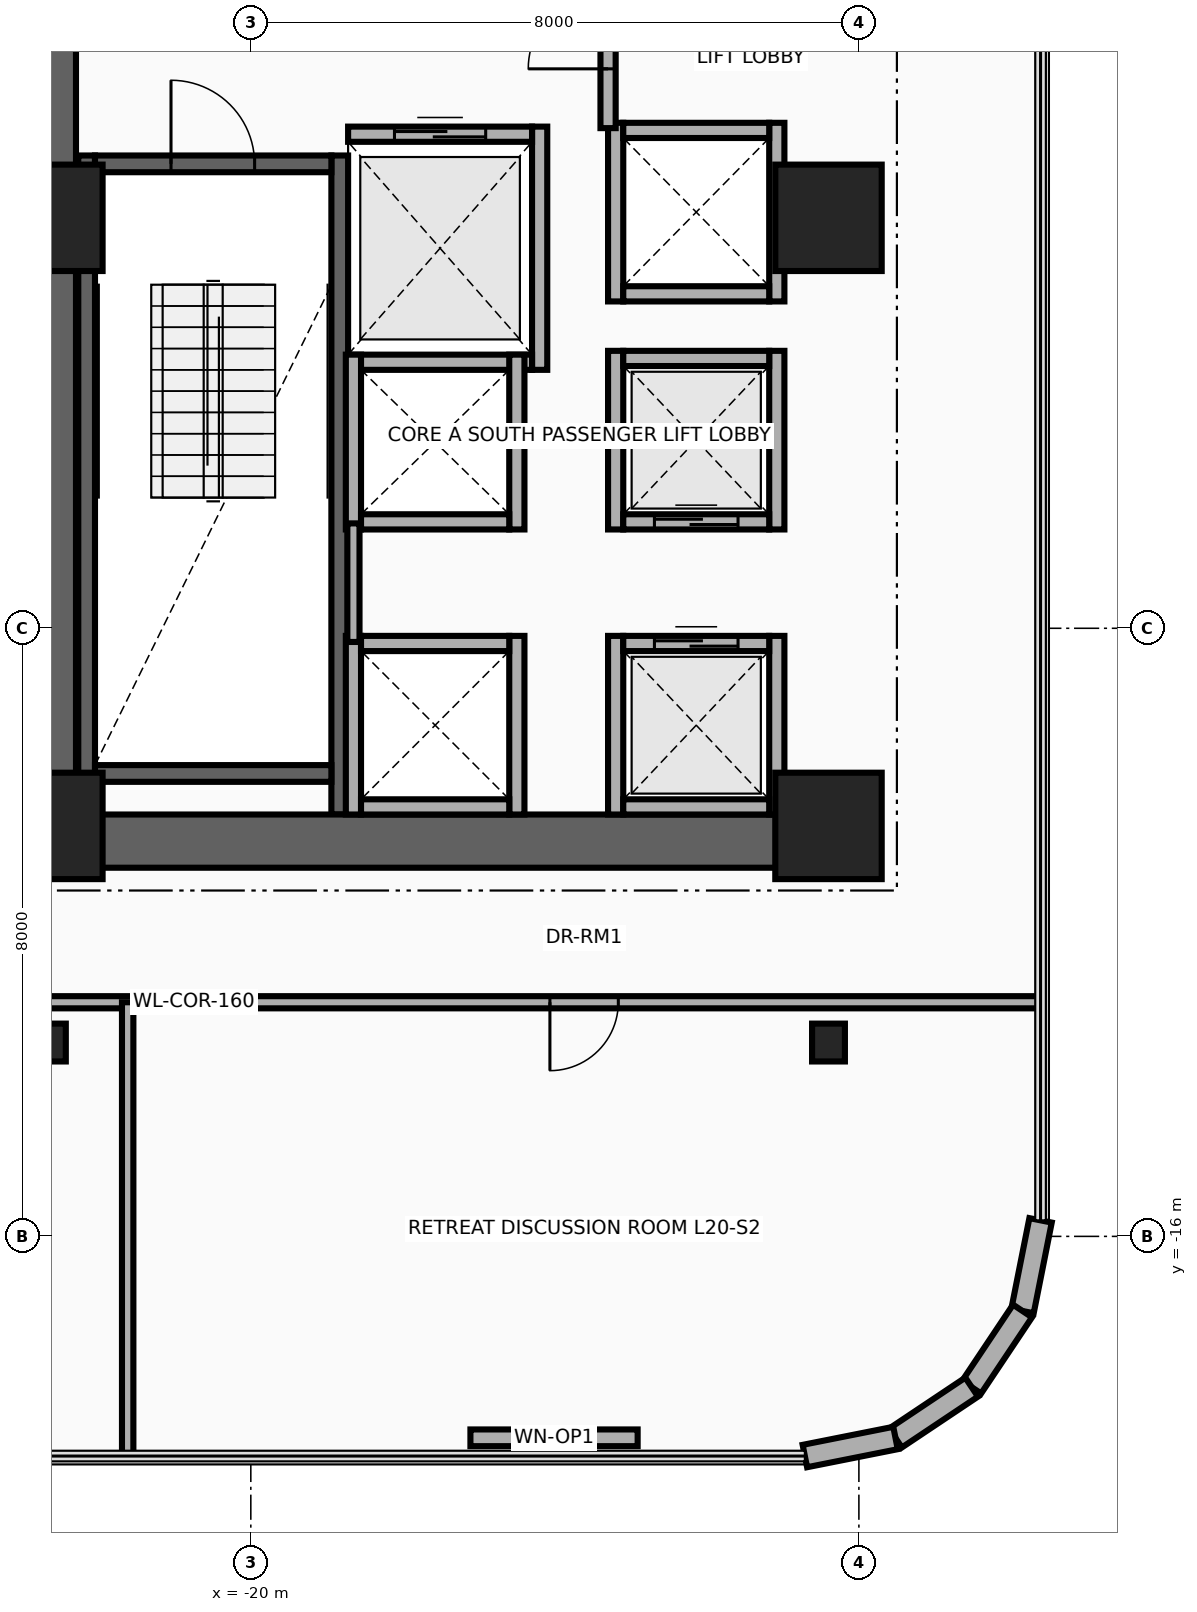
"""IFC4 building model, lengths in metres.
Left out: names, types, materials, properties, quantities, classifications, styles, units other than length and angle.
Written with IfcOpenShell. Run it as: python <this file> out.ifc"""

import sys

from ifc_helpers import new_model, si_unit, direction, frame, frame_2d, origin, origin_2d, place, context, subcontext, project, spatial, rectangle, i_section, extrude, source, transform, mapped, element, fill, save


model = new_model("IFC4")
c1 = context("Model", 3, precision=1e-05, world=origin(), true_north=direction((0.0, 1.0)))
c2 = subcontext(c1, "Body", "Model", "MODEL_VIEW")
j1 = project(units=[si_unit("LENGTHUNIT", "METRE"), si_unit("PLANEANGLEUNIT", "RADIAN")], contexts=[c1])
p1 = place(None, origin())
s1 = spatial("IfcSite", under=j1, at=p1, CompositionType="ELEMENT")
p2 = place(p1, origin())
s2 = spatial("IfcBuilding", under=s1, at=p2, CompositionType="ELEMENT")
p3 = place(p2, frame((0.0, 0.0, 81.5)))
s3 = spatial("IfcBuildingStorey", under=s2, at=p3, CompositionType="ELEMENT", Elevation=81.5)
for number, where, z_axis, x_axis in (
    (1, (-22.16, -10.45, 0.0), (0.0, 0.0, 1.0), (0.0, 1.0, 0.0)),
    (2, (-18.83, -10.45, 0.0), (0.0, 0.0, 1.0), (0.0, 1.0, 0.0)),
):
    element("IfcWall", number, at=place(p3, frame(where, z_axis=z_axis, x_axis=x_axis)), inside=s3, PredefinedType="SHEAR", context=c2, shape_type="SweptSolid", body=[
        extrude(rectangle(XDim=8.67, YDim=0.22, at=frame_2d((4.335, 0.0))), origin(), (0.0, 0.0, 1.0), 3.46),
    ])
p4 = place(p3, frame((-22.05, -9.91, 0.0), z_axis=(0.0, 0.0, 1.0), x_axis=(1.0, 0.0, 0.0)))
e3 = element("IfcWall", 3, at=p4, inside=s3, PredefinedType="SHEAR", context=c2, shape_type="SweptSolid", body=[
    extrude(rectangle(XDim=3.11, YDim=0.22, at=frame_2d((1.555, 0.0))), origin(), (0.0, 0.0, 1.0), 3.46),
])
p5 = place(p3, frame((-22.05, -1.89, 0.0), z_axis=(0.0, 0.0, 1.0), x_axis=(1.0, 0.0, 0.0)))
e4 = element("IfcWall", 4, at=p5, inside=s3, PredefinedType="SHEAR", context=c2, shape_type="SweptSolid", body=[
    extrude(rectangle(XDim=3.11, YDim=0.22, at=frame_2d((1.555, 0.0))), origin(), (0.0, 0.0, 1.0), 3.46),
])
p6 = place(p5, frame((1.0, 0.0, 0.0)))
e5 = element("IfcOpeningElement", 5, at=p6, cuts=e4, PredefinedType="OPENING", context=c2, shape_type="SweptSolid", body=[
    extrude(rectangle(XDim=1.1, YDim=2.15, at=frame_2d((0.55, 1.075))), frame((0.0, 0.125, 0.0), z_axis=(0.0, -1.0, 0.0), x_axis=(1.0, 0.0, 0.0)), (0.0, 0.0, 1.0), 0.25),
])
p7 = place(p3, frame((-22.65, -11.15, 0.0), z_axis=(0.0, 0.0, 1.0), x_axis=(0.0, 1.0, 0.0)))
e6 = element("IfcWall", 6, at=p7, inside=s3, PredefinedType="SHEAR", context=c2, shape_type="SweptSolid", body=[
    extrude(rectangle(XDim=22.3, YDim=0.7, at=frame_2d((11.15, 0.0))), origin(), (0.0, 0.0, 1.0), 3.46),
])
p8 = place(p3, frame((-22.65, -10.8, 0.0), z_axis=(0.0, 0.0, 1.0), x_axis=(1.0, 0.0, 0.0)))
e7 = element("IfcWall", 7, at=p8, inside=s3, PredefinedType="SHEAR", context=c2, shape_type="SweptSolid", body=[
    extrude(rectangle(XDim=10.25, YDim=0.7, at=frame_2d((5.125, 0.0))), origin(), (0.0, 0.0, 1.0), 3.46),
])
m1 = source(origin(), c2, "Body", "SweptSolid", [
    extrude(rectangle(XDim=1.4, YDim=1.4, at=origin_2d()), origin(), (0.0, 0.0, 1.0), 3.7),
])
for number, where, z_axis, x_axis in (
    (8, (-22.65, -10.6, 0.0), (0.0, 0.0, 1.0), (1.0, 0.0, 0.0)),
    (9, (-12.4, -10.6, 0.0), (0.0, 0.0, 1.0), (1.0, 0.0, 0.0)),
    (10, (-22.65, -2.6, 0.0), (0.0, 0.0, 1.0), (1.0, 0.0, 0.0)),
    (11, (-12.4, -2.6, 0.0), (0.0, 0.0, 1.0), (1.0, 0.0, 0.0)),
):
    element("IfcColumn", number, at=place(p3, frame(where, z_axis=z_axis, x_axis=x_axis)), inside=s3, PredefinedType="COLUMN", context=c2, shape_type="MappedRepresentation", body=[
        mapped(m1, transform((0.0, 0.0, 0.0), x_axis=(1.0, 0.0, 0.0), y_axis=(0.0, 1.0, 0.0), z_axis=(0.0, 0.0, 1.0), scale=1.0)),
    ])
m2 = source(origin(), c2, "Body", "SweptSolid", [
    extrude(i_section(OverallWidth=0.432, OverallDepth=0.498, WebThickness=0.056, FlangeThickness=0.089, at=origin_2d()), origin(), (0.0, 0.0, 1.0), 3.7),
])
for number, where, z_axis, x_axis in (
    (12, (-22.65, -13.45, 0.0), (0.0, 0.0, 1.0), (1.0, 0.0, 0.0)),
    (13, (-12.4, -13.45, 0.0), (0.0, 0.0, 1.0), (1.0, 0.0, 0.0)),
):
    element("IfcColumn", number, at=place(p3, frame(where, z_axis=z_axis, x_axis=x_axis)), inside=s3, PredefinedType="COLUMN", context=c2, shape_type="MappedRepresentation", body=[
        mapped(m2, transform((0.0, 0.0, 0.0), x_axis=(1.0, 0.0, 0.0), y_axis=(0.0, 1.0, 0.0), z_axis=(0.0, 0.0, 1.0), scale=1.0)),
    ])
p9 = place(p3, frame((-9.61, -15.789, 0.0), z_axis=(0.0, 0.0, 1.0), x_axis=(-0.194996050505, -0.980804027463, 0.0)))
e14 = element("IfcWall", 14, at=p9, inside=s3, PredefinedType="SOLIDWALL", context=c2, shape_type="SweptSolid", body=[
    extrude(rectangle(XDim=1.216, YDim=0.3, at=frame_2d((0.608, 0.0))), origin(), (0.0, 0.0, 1.0), 3.46),
])
for number, where, z_axis, x_axis in (
    (15, (-9.847, -16.982, 0.0), (0.0, 0.0, 1.0), (-0.556, -0.831, 0.0)),
    (16, (-10.517, -17.983, 0.0), (0.0, 0.0, 1.0), (-0.831, -0.556, 0.0)),
):
    element("IfcWall", number, at=place(p3, frame(where, z_axis=z_axis, x_axis=x_axis)), inside=s3, PredefinedType="SOLIDWALL", context=c2, shape_type="SweptSolid", body=[
        extrude(rectangle(XDim=1.205, YDim=0.3, at=frame_2d((0.603, 0.0))), origin(), (0.0, 0.0, 1.0), 3.46),
    ])
p10 = place(p3, frame((-11.518, -18.653, 0.0), z_axis=(0.0, 0.0, 1.0), x_axis=(-0.980804027463, -0.194996050505, 0.0)))
e17 = element("IfcWall", 17, at=p10, inside=s3, PredefinedType="SOLIDWALL", context=c2, shape_type="SweptSolid", body=[
    extrude(rectangle(XDim=1.216, YDim=0.3, at=frame_2d((0.608, 0.0))), origin(), (0.0, 0.0, 1.0), 3.46),
])
p11 = place(p3, frame((-14.911, -18.65, 0.0), z_axis=(0.0, 0.0, 1.0), x_axis=(-1.0, 0.0, 0.0)))
e18 = element("IfcWall", 18, at=p11, inside=s3, PredefinedType="SOLIDWALL", context=c2, shape_type="SweptSolid", body=[
    extrude(rectangle(XDim=2.2, YDim=0.22, at=frame_2d((1.1, 0.0))), origin(), (0.0, 0.0, 1.0), 3.46),
])
p12 = place(p11, frame((0.65, 0.0, 0.95)))
e19 = element("IfcOpeningElement", 19, at=p12, cuts=e18, PredefinedType="OPENING", context=c2, shape_type="SweptSolid", body=[
    extrude(rectangle(XDim=0.9, YDim=1.3, at=frame_2d((0.45, 0.65))), frame((0.0, 0.125, 0.0), z_axis=(0.0, -1.0, 0.0), x_axis=(1.0, 0.0, 0.0)), (0.0, 0.0, 1.0), 0.25),
])
p13 = place(p3, frame((-16.2, -4.6, 0.0), z_axis=(0.0, 0.0, 1.0), x_axis=(0.0, 1.0, 0.0)))
e20 = element("IfcWall", 20, at=p13, inside=s3, PredefinedType="MOVABLE", context=c2, shape_type="SweptSolid", body=[
    extrude(rectangle(XDim=3.2, YDim=0.2, at=frame_2d((1.6, 0.0))), origin(), (0.0, 0.0, 1.0), 3.46),
])
p14 = place(p3, frame((-18.72, -4.5, 0.0), z_axis=(0.0, 0.0, 1.0), x_axis=(1.0, 0.0, 0.0)))
e21 = element("IfcWall", 21, at=p14, inside=s3, PredefinedType="MOVABLE", context=c2, shape_type="SweptSolid", body=[
    extrude(rectangle(XDim=2.42, YDim=0.2, at=frame_2d((1.21, 0.0))), origin(), (0.0, 0.0, 1.0), 3.46),
])
p15 = place(p3, frame((-18.72, -1.5, 0.0), z_axis=(0.0, 0.0, 1.0), x_axis=(1.0, 0.0, 0.0)))
e22 = element("IfcWall", 22, at=p15, inside=s3, PredefinedType="MOVABLE", context=c2, shape_type="SweptSolid", body=[
    extrude(rectangle(XDim=2.42, YDim=0.2, at=frame_2d((1.21, 0.0))), origin(), (0.0, 0.0, 1.0), 3.46),
])
p16 = place(p15, frame((0.61, 0.0, 0.0)))
e23 = element("IfcOpeningElement", 23, at=p16, cuts=e22, PredefinedType="OPENING", context=c2, shape_type="SweptSolid", body=[
    extrude(rectangle(XDim=1.2, YDim=2.1, at=frame_2d((0.6, 1.05))), frame((0.0, 0.115, 0.0), z_axis=(0.0, -1.0, 0.0), x_axis=(1.0, 0.0, 0.0)), (0.0, 0.0, 1.0), 0.23),
])
for number, where, z_axis, x_axis in (
    (24, (-15.2, -10.45, 0.0), (0.0, 0.0, 1.0), (0.0, 1.0, 0.0)),
    (25, (-13.08, -10.45, 0.0), (0.0, 0.0, 1.0), (0.0, 1.0, 0.0)),
):
    element("IfcWall", number, at=place(p3, frame(where, z_axis=z_axis, x_axis=x_axis)), inside=s3, PredefinedType="MOVABLE", context=c2, shape_type="SweptSolid", body=[
        extrude(rectangle(XDim=2.35, YDim=0.2, at=frame_2d((1.175, 0.0))), origin(), (0.0, 0.0, 1.0), 2.583),
    ])
p17 = place(p3, frame((-15.1, -10.35, 0.0), z_axis=(0.0, 0.0, 1.0), x_axis=(1.0, 0.0, 0.0)))
e26 = element("IfcWall", 26, at=p17, inside=s3, PredefinedType="MOVABLE", context=c2, shape_type="SweptSolid", body=[
    extrude(rectangle(XDim=1.92, YDim=0.2, at=frame_2d((0.96, 0.0))), origin(), (0.0, 0.0, 1.0), 2.583),
])
p18 = place(p3, frame((-15.1, -8.2, 0.0), z_axis=(0.0, 0.0, 1.0), x_axis=(1.0, 0.0, 0.0)))
e27 = element("IfcWall", 27, at=p18, inside=s3, PredefinedType="MOVABLE", context=c2, shape_type="SweptSolid", body=[
    extrude(rectangle(XDim=1.92, YDim=0.2, at=frame_2d((0.96, 0.0))), origin(), (0.0, 0.0, 1.0), 3.46),
])
p19 = place(p18, frame((0.41, 0.0, 0.0)))
e28 = element("IfcOpeningElement", 28, at=p19, cuts=e27, PredefinedType="OPENING", context=c2, shape_type="SweptSolid", body=[
    extrude(rectangle(XDim=1.1, YDim=2.1, at=frame_2d((0.55, 1.05))), frame((0.0, 0.115, 0.0), z_axis=(0.0, -1.0, 0.0), x_axis=(1.0, 0.0, 0.0)), (0.0, 0.0, 1.0), 0.23),
])
for number, where, z_axis, x_axis in (
    (29, (-15.2, -6.7, 0.0), (0.0, 0.0, 1.0), (0.0, 1.0, 0.0)),
    (30, (-13.08, -6.7, 0.0), (0.0, 0.0, 1.0), (0.0, 1.0, 0.0)),
):
    element("IfcWall", number, at=place(p3, frame(where, z_axis=z_axis, x_axis=x_axis)), inside=s3, PredefinedType="MOVABLE", context=c2, shape_type="SweptSolid", body=[
        extrude(rectangle(XDim=2.35, YDim=0.2, at=frame_2d((1.175, 0.0))), origin(), (0.0, 0.0, 1.0), 3.46),
    ])
p20 = place(p3, frame((-15.1, -6.6, 0.0), z_axis=(0.0, 0.0, 1.0), x_axis=(1.0, 0.0, 0.0)))
e31 = element("IfcWall", 31, at=p20, inside=s3, PredefinedType="MOVABLE", context=c2, shape_type="SweptSolid", body=[
    extrude(rectangle(XDim=1.92, YDim=0.2, at=frame_2d((0.96, 0.0))), origin(), (0.0, 0.0, 1.0), 3.46),
])
p21 = place(p20, frame((0.41, 0.0, 0.0)))
e32 = element("IfcOpeningElement", 32, at=p21, cuts=e31, PredefinedType="OPENING", context=c2, shape_type="SweptSolid", body=[
    extrude(rectangle(XDim=1.1, YDim=2.1, at=frame_2d((0.55, 1.05))), frame((0.0, 0.115, 0.0), z_axis=(0.0, -1.0, 0.0), x_axis=(1.0, 0.0, 0.0)), (0.0, 0.0, 1.0), 0.23),
])
p22 = place(p3, frame((-15.1, -4.45, 0.0), z_axis=(0.0, 0.0, 1.0), x_axis=(1.0, 0.0, 0.0)))
e33 = element("IfcWall", 33, at=p22, inside=s3, PredefinedType="MOVABLE", context=c2, shape_type="SweptSolid", body=[
    extrude(rectangle(XDim=1.92, YDim=0.2, at=frame_2d((0.96, 0.0))), origin(), (0.0, 0.0, 1.0), 3.46),
])
for number, where, z_axis, x_axis in (
    (34, (-18.65, -10.45, 0.0), (0.0, 0.0, 1.0), (0.0, 1.0, 0.0)),
    (35, (-16.5, -10.45, 0.0), (0.0, 0.0, 1.0), (0.0, 1.0, 0.0)),
):
    element("IfcWall", number, at=place(p3, frame(where, z_axis=z_axis, x_axis=x_axis)), inside=s3, PredefinedType="MOVABLE", context=c2, shape_type="SweptSolid", body=[
        extrude(rectangle(XDim=2.35, YDim=0.2, at=frame_2d((1.175, 0.0))), origin(), (0.0, 0.0, 1.0), 2.583),
    ])
p23 = place(p3, frame((-18.55, -10.35, 0.0), z_axis=(0.0, 0.0, 1.0), x_axis=(1.0, 0.0, 0.0)))
e36 = element("IfcWall", 36, at=p23, inside=s3, PredefinedType="MOVABLE", context=c2, shape_type="SweptSolid", body=[
    extrude(rectangle(XDim=1.95, YDim=0.2, at=frame_2d((0.975, 0.0))), origin(), (0.0, 0.0, 1.0), 2.583),
])
p24 = place(p3, frame((-18.55, -8.2, 0.0), z_axis=(0.0, 0.0, 1.0), x_axis=(1.0, 0.0, 0.0)))
e37 = element("IfcWall", 37, at=p24, inside=s3, PredefinedType="MOVABLE", context=c2, shape_type="SweptSolid", body=[
    extrude(rectangle(XDim=1.95, YDim=0.2, at=frame_2d((0.975, 0.0))), origin(), (0.0, 0.0, 1.0), 3.46),
])
for number, where, z_axis, x_axis in (
    (38, (-18.65, -6.7, 0.0), (0.0, 0.0, 1.0), (0.0, 1.0, 0.0)),
    (39, (-16.5, -6.7, 0.0), (0.0, 0.0, 1.0), (0.0, 1.0, 0.0)),
):
    element("IfcWall", number, at=place(p3, frame(where, z_axis=z_axis, x_axis=x_axis)), inside=s3, PredefinedType="MOVABLE", context=c2, shape_type="SweptSolid", body=[
        extrude(rectangle(XDim=2.3, YDim=0.2, at=frame_2d((1.15, 0.0))), origin(), (0.0, 0.0, 1.0), 3.46),
    ])
p25 = place(p3, frame((-18.55, -6.6, 0.0), z_axis=(0.0, 0.0, 1.0), x_axis=(1.0, 0.0, 0.0)))
e40 = element("IfcWall", 40, at=p25, inside=s3, PredefinedType="MOVABLE", context=c2, shape_type="SweptSolid", body=[
    extrude(rectangle(XDim=1.95, YDim=0.2, at=frame_2d((0.975, 0.0))), origin(), (0.0, 0.0, 1.0), 3.46),
])
for number, where, z_axis, x_axis in (
    (41, (-15.2, -3.7, 0.0), (0.0, 0.0, 1.0), (0.0, 1.0, 0.0)),
    (42, (-13.08, -3.7, 0.0), (0.0, 0.0, 1.0), (0.0, 1.0, 0.0)),
):
    element("IfcWall", number, at=place(p3, frame(where, z_axis=z_axis, x_axis=x_axis)), inside=s3, PredefinedType="MOVABLE", context=c2, shape_type="SweptSolid", body=[
        extrude(rectangle(XDim=2.35, YDim=0.2, at=frame_2d((1.175, 0.0))), origin(), (0.0, 0.0, 1.0), 3.46),
    ])
for number, where, z_axis, x_axis in (
    (43, (-15.1, -3.6, 0.0), (0.0, 0.0, 1.0), (1.0, 0.0, 0.0)),
    (44, (-15.1, -1.45, 0.0), (0.0, 0.0, 1.0), (1.0, 0.0, 0.0)),
):
    element("IfcWall", number, at=place(p3, frame(where, z_axis=z_axis, x_axis=x_axis)), inside=s3, PredefinedType="MOVABLE", context=c2, shape_type="SweptSolid", body=[
        extrude(rectangle(XDim=1.92, YDim=0.2, at=frame_2d((0.96, 0.0))), origin(), (0.0, 0.0, 1.0), 3.46),
    ])
p26 = place(p3, frame((-15.3, -1.42, 0.0), z_axis=(0.0, 0.0, 1.0), x_axis=(0.0, 1.0, 0.0)))
e45 = element("IfcWall", 45, at=p26, inside=s3, PredefinedType="PARTITIONING", context=c2, shape_type="SweptSolid", body=[
    extrude(rectangle(XDim=2.67, YDim=0.2, at=frame_2d((1.335, 0.0))), origin(), (0.0, 0.0, 1.0), 3.46),
])
p27 = place(p26, frame((0.78, 0.0, 0.0)))
e46 = element("IfcOpeningElement", 46, at=p27, cuts=e45, PredefinedType="OPENING", context=c2, shape_type="SweptSolid", body=[
    extrude(rectangle(XDim=1.05, YDim=2.15, at=frame_2d((0.525, 1.075))), frame((0.0, 0.115, 0.0), z_axis=(0.0, -1.0, 0.0), x_axis=(1.0, 0.0, 0.0)), (0.0, 0.0, 1.0), 0.23),
])
p28 = place(p3, frame((-18.65, -8.18, 0.0), z_axis=(0.0, 0.0, 1.0), x_axis=(0.0, 1.0, 0.0)))
e47 = element("IfcWall", 47, at=p28, inside=s3, PredefinedType="PARTITIONING", context=c2, shape_type="SweptSolid", body=[
    extrude(rectangle(XDim=1.56, YDim=0.16, at=frame_2d((0.78, 0.0))), origin(), (0.0, 0.0, 1.0), 3.46),
])
p29 = place(p3, frame((-31.89, -12.92, 0.0), z_axis=(0.0, 0.0, 1.0), x_axis=(1.0, 0.0, 0.0)))
e48 = element("IfcWall", 48, at=p29, inside=s3, PredefinedType="PARTITIONING", context=c2, shape_type="SweptSolid", body=[
    extrude(rectangle(XDim=22.28, YDim=0.16, at=frame_2d((11.14, 0.0))), origin(), (0.0, 0.0, 1.0), 2.834),
])
p30 = place(p29, frame((4.685, 0.0, 0.0)))
e49 = element("IfcOpeningElement", 49, at=p30, cuts=e48, PredefinedType="OPENING", context=c2, shape_type="SweptSolid", body=[
    extrude(rectangle(XDim=0.9, YDim=2.1, at=frame_2d((0.45, 1.05))), frame((0.0, 0.095, 0.0), z_axis=(0.0, -1.0, 0.0), x_axis=(1.0, 0.0, 0.0)), (0.0, 0.0, 1.0), 0.19),
])
p31 = place(p29, frame((15.825, 0.0, 0.0)))
e50 = element("IfcOpeningElement", 50, at=p31, cuts=e48, PredefinedType="OPENING", context=c2, shape_type="SweptSolid", body=[
    extrude(rectangle(XDim=0.9, YDim=2.1, at=frame_2d((0.45, 1.05))), frame((0.0, 0.095, 0.0), z_axis=(0.0, -1.0, 0.0), x_axis=(1.0, 0.0, 0.0)), (0.0, 0.0, 1.0), 0.19),
])
p32 = place(p3, frame((-21.62, -18.89, 0.0), z_axis=(0.0, 0.0, 1.0), x_axis=(0.0, 1.0, 0.0)))
e51 = element("IfcWall", 51, at=p32, inside=s3, PredefinedType="PARTITIONING", context=c2, shape_type="SweptSolid", body=[
    extrude(rectangle(XDim=5.97, YDim=0.15, at=frame_2d((2.985, 0.0))), origin(), (0.0, 0.0, 1.0), 2.896),
])
p33 = place(p12, origin())
e52 = element("IfcWindow", 52, at=p33, inside=s3, PartitioningType="SINGLE_PANEL", PredefinedType="WINDOW", context=c2, shape_type="SweptSolid", body=[
    extrude(rectangle(XDim=0.9, YDim=1.3, at=frame_2d((0.45, 0.65))), frame((0.0, 0.03, 0.0), z_axis=(0.0, -1.0, 0.0), x_axis=(1.0, 0.0, 0.0)), (0.0, 0.0, 1.0), 0.06),
])
fill(e19, e52)
p34 = place(p16, origin())
e53 = element("IfcDoor", 53, at=p34, inside=s3, OperationType="DOUBLE_DOOR_SLIDING", PredefinedType="DOOR", context=c2, shape_type="SweptSolid", body=[
    extrude(rectangle(XDim=1.2, YDim=2.1, at=frame_2d((0.6, 1.05))), frame((0.0, 0.025, 0.0), z_axis=(0.0, -1.0, 0.0), x_axis=(1.0, 0.0, 0.0)), (0.0, 0.0, 1.0), 0.05),
])
fill(e23, e53)
p35 = place(p19, origin())
e54 = element("IfcDoor", 54, at=p35, inside=s3, OperationType="DOUBLE_DOOR_SLIDING", PredefinedType="DOOR", context=c2, shape_type="SweptSolid", body=[
    extrude(rectangle(XDim=1.1, YDim=2.1, at=frame_2d((0.55, 1.05))), frame((0.0, 0.025, 0.0), z_axis=(0.0, -1.0, 0.0), x_axis=(1.0, 0.0, 0.0)), (0.0, 0.0, 1.0), 0.05),
])
fill(e28, e54)
p36 = place(p21, origin())
e55 = element("IfcDoor", 55, at=p36, inside=s3, OperationType="DOUBLE_DOOR_SLIDING", PredefinedType="DOOR", context=c2, shape_type="SweptSolid", body=[
    extrude(rectangle(XDim=1.1, YDim=2.1, at=frame_2d((0.55, 1.05))), frame((0.0, 0.025, 0.0), z_axis=(0.0, -1.0, 0.0), x_axis=(1.0, 0.0, 0.0)), (0.0, 0.0, 1.0), 0.05),
])
fill(e32, e55)
p37 = place(p27, origin())
e56 = element("IfcDoor", 56, at=p37, inside=s3, OperationType="SINGLE_SWING_RIGHT", PredefinedType="DOOR", context=c2, shape_type="SweptSolid", body=[
    extrude(rectangle(XDim=1.05, YDim=2.15, at=frame_2d((0.525, 1.075))), frame((0.0, 0.025, 0.0), z_axis=(0.0, -1.0, 0.0), x_axis=(1.0, 0.0, 0.0)), (0.0, 0.0, 1.0), 0.05),
])
fill(e46, e56)
p38 = place(p6, origin())
e57 = element("IfcDoor", 57, at=p38, inside=s3, OperationType="SINGLE_SWING_RIGHT", PredefinedType="DOOR", context=c2, shape_type="SweptSolid", body=[
    extrude(rectangle(XDim=1.1, YDim=2.15, at=frame_2d((0.55, 1.075))), frame((0.0, 0.025, 0.0), z_axis=(0.0, -1.0, 0.0), x_axis=(1.0, 0.0, 0.0)), (0.0, 0.0, 1.0), 0.05),
])
fill(e5, e57)
p39 = place(p31, frame((0.9, 0.0, 0.0), z_axis=(0.0, 0.0, 1.0), x_axis=(-1.0, 0.0, 0.0)))
e58 = element("IfcDoor", 58, at=p39, inside=s3, OperationType="SINGLE_SWING_LEFT", PredefinedType="DOOR", context=c2, shape_type="SweptSolid", body=[
    extrude(rectangle(XDim=0.9, YDim=2.1, at=frame_2d((0.45, 1.05))), frame((0.0, 0.025, 0.0), z_axis=(0.0, -1.0, 0.0), x_axis=(1.0, 0.0, 0.0)), (0.0, 0.0, 1.0), 0.05),
])
fill(e50, e58)
save(model, sys.argv[1])
